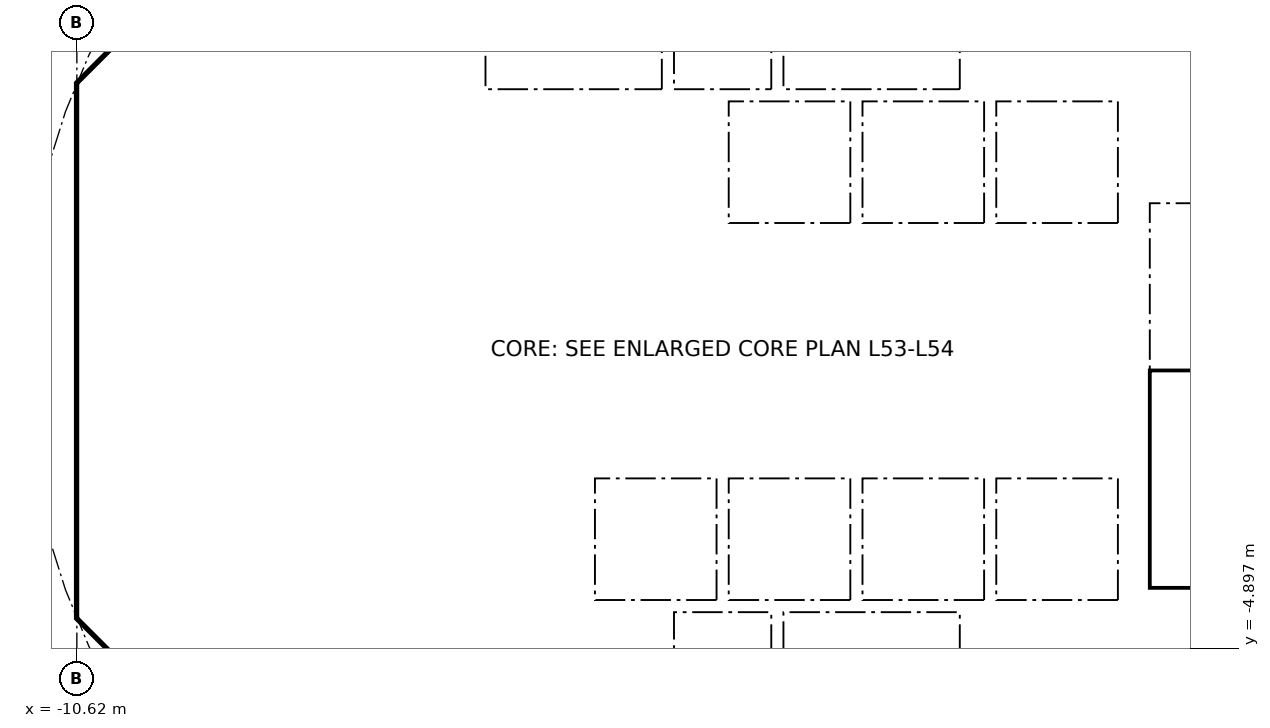
"""IFC4 building model, lengths in metres.
Left out: names, types, materials, properties, quantities, classifications, styles, units other than length and angle.
Written with IfcOpenShell. Run it as: python <this file> out.ifc"""

import sys

from ifc_helpers import new_model, si_unit, direction, frame, frame_2d, origin, place, context, subcontext, project, spatial, polyline, rectangle, outline, extrude, element, fill, save


model = new_model("IFC4")
c1 = context("Model", 3, precision=1e-05, world=origin(), true_north=direction((0.0, 1.0)))
c2 = subcontext(c1, "Body", "Model", "MODEL_VIEW")
j1 = project(units=[si_unit("LENGTHUNIT", "METRE"), si_unit("PLANEANGLEUNIT", "RADIAN")], contexts=[c1])
p1 = place(None, origin())
s1 = spatial("IfcSite", under=j1, at=p1, CompositionType="ELEMENT")
p2 = place(p1, origin())
s2 = spatial("IfcBuilding", under=s1, at=p2, CompositionType="ELEMENT")
p3 = place(p2, frame((0.0, 0.0, 212.2)))
s3 = spatial("IfcBuildingStorey", under=s2, at=p3, CompositionType="ELEMENT", Elevation=212.2)
p4 = place(p3, frame((9.988, 4.613, 0.0), z_axis=(0.0, 0.0, 1.0), x_axis=(-0.707106781187, 0.707106781187, 0.0)))
e1 = element("IfcWall", 1, at=p4, inside=s3, PredefinedType="SHEAR", context=c2, shape_type="SweptSolid", body=[
    extrude(rectangle(XDim=7.602, YDim=0.6, at=frame_2d((3.801, 0.0))), origin(), (0.0, 0.0, 1.0), 3.44),
])
p5 = place(p4, frame((3.201, 0.0, 0.0)))
e2 = element("IfcOpeningElement", 2, at=p5, cuts=e1, PredefinedType="OPENING", context=c2, shape_type="SweptSolid", body=[
    extrude(rectangle(XDim=1.2, YDim=2.1, at=frame_2d((0.6, 1.05))), frame((0.0, 0.31, 0.0), z_axis=(0.0, -1.0, 0.0), x_axis=(1.0, 0.0, 0.0)), (0.0, 0.0, 1.0), 0.62),
])
p6 = place(p3, frame((-4.613, 9.988, 0.0), z_axis=(0.0, 0.0, 1.0), x_axis=(-0.707106781187, -0.707106781187, 0.0)))
e3 = element("IfcWall", 3, at=p6, inside=s3, PredefinedType="SHEAR", context=c2, shape_type="SweptSolid", body=[
    extrude(rectangle(XDim=7.602, YDim=0.6, at=frame_2d((3.801, 0.0))), origin(), (0.0, 0.0, 1.0), 3.44),
])
p7 = place(p6, frame((0.351, 0.0, 0.0)))
e4 = element("IfcOpeningElement", 4, at=p7, cuts=e3, PredefinedType="OPENING", context=c2, shape_type="SweptSolid", body=[
    extrude(rectangle(XDim=1.1, YDim=2.1, at=frame_2d((0.55, 1.05))), frame((0.0, 0.31, 0.0), z_axis=(0.0, -1.0, 0.0), x_axis=(1.0, 0.0, 0.0)), (0.0, 0.0, 1.0), 0.62),
])
p8 = place(p3, frame((-10.325, 3.801, 0.0), z_axis=(0.0, 0.0, 1.0), x_axis=(0.0, -1.0, 0.0)))
e5 = element("IfcWall", 5, at=p8, inside=s3, PredefinedType="SHEAR", context=c2, shape_type="SweptSolid", body=[
    extrude(rectangle(XDim=7.602, YDim=0.6, at=frame_2d((3.801, 0.0))), origin(), (0.0, 0.0, 1.0), 3.44),
])
p9 = place(p8, frame((0.651, 0.0, 0.0)))
e6 = element("IfcOpeningElement", 6, at=p9, cuts=e5, PredefinedType="OPENING", context=c2, shape_type="SweptSolid", body=[
    extrude(rectangle(XDim=1.5, YDim=2.1, at=frame_2d((0.75, 1.05))), frame((0.0, 0.31, 0.0), z_axis=(0.0, -1.0, 0.0), x_axis=(1.0, 0.0, 0.0)), (0.0, 0.0, 1.0), 0.62),
])
p10 = place(p8, frame((5.451, 0.0, 0.0)))
e7 = element("IfcOpeningElement", 7, at=p10, cuts=e5, PredefinedType="OPENING", context=c2, shape_type="SweptSolid", body=[
    extrude(rectangle(XDim=1.5, YDim=2.1, at=frame_2d((0.75, 1.05))), frame((0.0, 0.31, 0.0), z_axis=(0.0, -1.0, 0.0), x_axis=(1.0, 0.0, 0.0)), (0.0, 0.0, 1.0), 0.62),
])
p11 = place(p3, frame((-9.988, -4.613, 0.0), z_axis=(0.0, 0.0, 1.0), x_axis=(0.707106781187, -0.707106781187, 0.0)))
e8 = element("IfcWall", 8, at=p11, inside=s3, PredefinedType="SHEAR", context=c2, shape_type="SweptSolid", body=[
    extrude(rectangle(XDim=7.602, YDim=0.6, at=frame_2d((3.801, 0.0))), origin(), (0.0, 0.0, 1.0), 3.44),
])
p12 = place(p11, frame((6.151, 0.0, 0.0)))
e9 = element("IfcOpeningElement", 9, at=p12, cuts=e8, PredefinedType="OPENING", context=c2, shape_type="SweptSolid", body=[
    extrude(rectangle(XDim=1.1, YDim=2.1, at=frame_2d((0.55, 1.05))), frame((0.0, 0.31, 0.0), z_axis=(0.0, -1.0, 0.0), x_axis=(1.0, 0.0, 0.0)), (0.0, 0.0, 1.0), 0.62),
])
p13 = place(p3, frame((4.613, -9.988, 0.0), z_axis=(0.0, 0.0, 1.0), x_axis=(0.707106781187, 0.707106781187, 0.0)))
e10 = element("IfcWall", 10, at=p13, inside=s3, PredefinedType="SHEAR", context=c2, shape_type="SweptSolid", body=[
    extrude(rectangle(XDim=7.602, YDim=0.6, at=frame_2d((3.801, 0.0))), origin(), (0.0, 0.0, 1.0), 3.44),
])
p14 = place(p13, frame((3.201, 0.0, 0.0)))
e11 = element("IfcOpeningElement", 11, at=p14, cuts=e10, PredefinedType="OPENING", context=c2, shape_type="SweptSolid", body=[
    extrude(rectangle(XDim=1.2, YDim=2.1, at=frame_2d((0.6, 1.05))), frame((0.0, 0.31, 0.0), z_axis=(0.0, -1.0, 0.0), x_axis=(1.0, 0.0, 0.0)), (0.0, 0.0, 1.0), 0.62),
])
p15 = place(p3, frame((-5.8, 4.3, 0.0), z_axis=(0.0, 0.0, 1.0), x_axis=(0.0, 1.0, 0.0)))
e12 = element("IfcWall", 12, at=p15, inside=s3, PredefinedType="PARTITIONING", context=c2, shape_type="SweptSolid", body=[
    extrude(rectangle(XDim=3.927, YDim=0.15, at=frame_2d((1.963, 0.0))), origin(), (0.0, 0.0, 1.0), 3.44),
])
p16 = place(p15, frame((1.551, 0.0, 0.0)))
e13 = element("IfcOpeningElement", 13, at=p16, cuts=e12, PredefinedType="OPENING", context=c2, shape_type="SweptSolid", body=[
    extrude(rectangle(XDim=0.9, YDim=2.1, at=frame_2d((0.45, 1.05))), frame((0.0, 0.085, 0.0), z_axis=(0.0, -1.0, 0.0), x_axis=(1.0, 0.0, 0.0)), (0.0, 0.0, 1.0), 0.17),
])
p17 = place(p3, frame((4.0, 4.3, 0.0), z_axis=(0.0, 0.0, 1.0), x_axis=(0.0, 1.0, 0.0)))
e14 = element("IfcWall", 14, at=p17, inside=s3, PredefinedType="SOLIDWALL", context=c2, shape_type="SweptSolid", body=[
    extrude(rectangle(XDim=2.2, YDim=0.2, at=frame_2d((1.1, 0.0))), origin(), (0.0, 0.0, 1.0), 3.44),
])
p18 = place(p17, frame((0.55, 0.0, 0.0)))
e15 = element("IfcOpeningElement", 15, at=p18, cuts=e14, PredefinedType="OPENING", context=c2, shape_type="SweptSolid", body=[
    extrude(rectangle(XDim=1.1, YDim=2.1, at=frame_2d((0.55, 1.05))), frame((0.0, 0.11, 0.0), z_axis=(0.0, -1.0, 0.0), x_axis=(1.0, 0.0, 0.0)), (0.0, 0.0, 1.0), 0.22),
])
p19 = place(p3, frame((-4.0, 4.3, 0.0), z_axis=(0.0, 0.0, 1.0), x_axis=(0.0, 1.0, 0.0)))
e16 = element("IfcWall", 16, at=p19, inside=s3, PredefinedType="SOLIDWALL", context=c2, shape_type="SweptSolid", body=[
    extrude(rectangle(XDim=2.2, YDim=0.2, at=frame_2d((1.1, 0.0))), origin(), (0.0, 0.0, 1.0), 3.44),
])
p20 = place(p19, frame((0.55, 0.0, 0.0)))
e17 = element("IfcOpeningElement", 17, at=p20, cuts=e16, PredefinedType="OPENING", context=c2, shape_type="SweptSolid", body=[
    extrude(rectangle(XDim=1.1, YDim=2.1, at=frame_2d((0.55, 1.05))), frame((0.0, 0.11, 0.0), z_axis=(0.0, -1.0, 0.0), x_axis=(1.0, 0.0, 0.0)), (0.0, 0.0, 1.0), 0.22),
])
p21 = place(p3, frame((-6.7, 2.0, 0.0), z_axis=(0.0, 0.0, 1.0), x_axis=(1.0, 0.0, 0.0)))
e18 = element("IfcWall", 18, at=p21, inside=s3, PredefinedType="SOLIDWALL", context=c2, shape_type="SweptSolid", body=[
    extrude(rectangle(XDim=13.4, YDim=0.2, at=frame_2d((6.7, 0.0))), origin(), (0.0, 0.0, 1.0), 3.44),
])
p22 = place(p21, frame((7.25, 0.0, 0.0)))
e19 = element("IfcOpeningElement", 19, at=p22, cuts=e18, PredefinedType="OPENING", context=c2, shape_type="SweptSolid", body=[
    extrude(rectangle(XDim=1.1, YDim=2.1, at=frame_2d((0.55, 1.05))), frame((0.0, 0.11, 0.0), z_axis=(0.0, -1.0, 0.0), x_axis=(1.0, 0.0, 0.0)), (0.0, 0.0, 1.0), 0.22),
])
p23 = place(p21, frame((9.45, 0.0, 0.0)))
e20 = element("IfcOpeningElement", 20, at=p23, cuts=e18, PredefinedType="OPENING", context=c2, shape_type="SweptSolid", body=[
    extrude(rectangle(XDim=1.1, YDim=2.1, at=frame_2d((0.55, 1.05))), frame((0.0, 0.11, 0.0), z_axis=(0.0, -1.0, 0.0), x_axis=(1.0, 0.0, 0.0)), (0.0, 0.0, 1.0), 0.22),
])
p24 = place(p21, frame((0.75, 0.0, 0.0)))
e21 = element("IfcOpeningElement", 21, at=p24, cuts=e18, PredefinedType="OPENING", context=c2, shape_type="SweptSolid", body=[
    extrude(rectangle(XDim=0.9, YDim=2.1, at=frame_2d((0.45, 1.05))), frame((0.0, 0.11, 0.0), z_axis=(0.0, -1.0, 0.0), x_axis=(1.0, 0.0, 0.0)), (0.0, 0.0, 1.0), 0.22),
])
p25 = place(p21, frame((4.05, 0.0, 0.0)))
e22 = element("IfcOpeningElement", 22, at=p25, cuts=e18, PredefinedType="OPENING", context=c2, shape_type="SweptSolid", body=[
    extrude(rectangle(XDim=0.9, YDim=2.1, at=frame_2d((0.45, 1.05))), frame((0.0, 0.11, 0.0), z_axis=(0.0, -1.0, 0.0), x_axis=(1.0, 0.0, 0.0)), (0.0, 0.0, 1.0), 0.22),
])
p26 = place(p3, frame((6.7, 4.0, 0.0), z_axis=(0.0, 0.0, 1.0), x_axis=(1.0, 0.0, 0.0)))
e23 = element("IfcWall", 23, at=p26, inside=s3, PredefinedType="SOLIDWALL", context=c2, shape_type="SweptSolid", body=[
    extrude(rectangle(XDim=3.325, YDim=0.2, at=frame_2d((1.662, 0.0))), origin(), (0.0, 0.0, 1.0), 3.44),
])
p27 = place(p26, frame((1.25, 0.0, 0.0)))
e24 = element("IfcOpeningElement", 24, at=p27, cuts=e23, PredefinedType="OPENING", context=c2, shape_type="SweptSolid", body=[
    extrude(rectangle(XDim=1.1, YDim=2.1, at=frame_2d((0.55, 1.05))), frame((0.0, 0.11, 0.0), z_axis=(0.0, -1.0, 0.0), x_axis=(1.0, 0.0, 0.0)), (0.0, 0.0, 1.0), 0.22),
])
p28 = place(p3, frame((-5.8, -8.227, 0.0), z_axis=(0.0, 0.0, 1.0), x_axis=(0.0, 1.0, 0.0)))
e25 = element("IfcWall", 25, at=p28, inside=s3, PredefinedType="PARTITIONING", context=c2, shape_type="SweptSolid", body=[
    extrude(rectangle(XDim=3.927, YDim=0.15, at=frame_2d((1.963, 0.0))), origin(), (0.0, 0.0, 1.0), 3.44),
])
p29 = place(p28, frame((2.615, 0.0, 0.0)))
e26 = element("IfcOpeningElement", 26, at=p29, cuts=e25, PredefinedType="OPENING", context=c2, shape_type="SweptSolid", body=[
    extrude(rectangle(XDim=0.9, YDim=2.1, at=frame_2d((0.45, 1.05))), frame((0.0, 0.085, 0.0), z_axis=(0.0, -1.0, 0.0), x_axis=(1.0, 0.0, 0.0)), (0.0, 0.0, 1.0), 0.17),
])
p30 = place(p28, frame((0.539, 0.0, 0.0)))
e27 = element("IfcOpeningElement", 27, at=p30, cuts=e25, PredefinedType="OPENING", context=c2, shape_type="SweptSolid", body=[
    extrude(rectangle(XDim=0.9, YDim=2.1, at=frame_2d((0.45, 1.05))), frame((0.0, 0.085, 0.0), z_axis=(0.0, -1.0, 0.0), x_axis=(1.0, 0.0, 0.0)), (0.0, 0.0, 1.0), 0.17),
])
p31 = place(p3, frame((4.0, -6.5, 0.0), z_axis=(0.0, 0.0, 1.0), x_axis=(0.0, 1.0, 0.0)))
e28 = element("IfcWall", 28, at=p31, inside=s3, PredefinedType="SOLIDWALL", context=c2, shape_type="SweptSolid", body=[
    extrude(rectangle(XDim=2.2, YDim=0.2, at=frame_2d((1.1, 0.0))), origin(), (0.0, 0.0, 1.0), 3.44),
])
p32 = place(p31, frame((0.55, 0.0, 0.0)))
e29 = element("IfcOpeningElement", 29, at=p32, cuts=e28, PredefinedType="OPENING", context=c2, shape_type="SweptSolid", body=[
    extrude(rectangle(XDim=1.1, YDim=2.1, at=frame_2d((0.55, 1.05))), frame((0.0, 0.11, 0.0), z_axis=(0.0, -1.0, 0.0), x_axis=(1.0, 0.0, 0.0)), (0.0, 0.0, 1.0), 0.22),
])
p33 = place(p3, frame((-4.0, -6.5, 0.0), z_axis=(0.0, 0.0, 1.0), x_axis=(0.0, 1.0, 0.0)))
e30 = element("IfcWall", 30, at=p33, inside=s3, PredefinedType="SOLIDWALL", context=c2, shape_type="SweptSolid", body=[
    extrude(rectangle(XDim=2.2, YDim=0.2, at=frame_2d((1.1, 0.0))), origin(), (0.0, 0.0, 1.0), 3.44),
])
p34 = place(p33, frame((0.65, 0.0, 0.0)))
e31 = element("IfcOpeningElement", 31, at=p34, cuts=e30, PredefinedType="OPENING", context=c2, shape_type="SweptSolid", body=[
    extrude(rectangle(XDim=0.9, YDim=2.1, at=frame_2d((0.45, 1.05))), frame((0.0, 0.11, 0.0), z_axis=(0.0, -1.0, 0.0), x_axis=(1.0, 0.0, 0.0)), (0.0, 0.0, 1.0), 0.22),
])
p35 = place(p3, frame((-6.7, -2.0, 0.0), z_axis=(0.0, 0.0, 1.0), x_axis=(1.0, 0.0, 0.0)))
e32 = element("IfcWall", 32, at=p35, inside=s3, PredefinedType="SOLIDWALL", context=c2, shape_type="SweptSolid", body=[
    extrude(rectangle(XDim=13.4, YDim=0.2, at=frame_2d((6.7, 0.0))), origin(), (0.0, 0.0, 1.0), 3.44),
])
p36 = place(p35, frame((5.05, 0.0, 0.0)))
e33 = element("IfcOpeningElement", 33, at=p36, cuts=e32, PredefinedType="OPENING", context=c2, shape_type="SweptSolid", body=[
    extrude(rectangle(XDim=1.1, YDim=2.1, at=frame_2d((0.55, 1.05))), frame((0.0, 0.11, 0.0), z_axis=(0.0, -1.0, 0.0), x_axis=(1.0, 0.0, 0.0)), (0.0, 0.0, 1.0), 0.22),
])
p37 = place(p35, frame((7.25, 0.0, 0.0)))
e34 = element("IfcOpeningElement", 34, at=p37, cuts=e32, PredefinedType="OPENING", context=c2, shape_type="SweptSolid", body=[
    extrude(rectangle(XDim=1.1, YDim=2.1, at=frame_2d((0.55, 1.05))), frame((0.0, 0.11, 0.0), z_axis=(0.0, -1.0, 0.0), x_axis=(1.0, 0.0, 0.0)), (0.0, 0.0, 1.0), 0.22),
])
p38 = place(p35, frame((1.85, 0.0, 0.0)))
e35 = element("IfcOpeningElement", 35, at=p38, cuts=e32, PredefinedType="OPENING", context=c2, shape_type="SweptSolid", body=[
    extrude(rectangle(XDim=0.9, YDim=2.1, at=frame_2d((0.45, 1.05))), frame((0.0, 0.11, 0.0), z_axis=(0.0, -1.0, 0.0), x_axis=(1.0, 0.0, 0.0)), (0.0, 0.0, 1.0), 0.22),
])
p39 = place(p3, origin())
e36 = element("IfcWall", 36, at=p39, inside=s3, PredefinedType="SHEAR", context=c2, shape_type="SweptSolid", body=[
    extrude(outline(polyline([(-10.625, -3.801), (-10.025, -3.801), (-10.025, -4.152), (-9.776, -4.401), (-10.2, -4.825), (-10.625, -4.401), (-10.625, -3.801)])), origin(), (0.0, 0.0, 1.0), 3.44),
])
p40 = place(p3, origin())
e37 = element("IfcWall", 37, at=p40, inside=s3, PredefinedType="SHEAR", context=c2, shape_type="SweptSolid", body=[
    extrude(outline(polyline([(-10.2, 4.825), (-9.776, 4.401), (-10.025, 4.152), (-10.025, 3.801), (-10.625, 3.801), (-10.625, 4.401), (-10.2, 4.825)])), origin(), (0.0, 0.0, 1.0), 3.44),
])
for number, where, z_axis, x_axis in (
    (38, (-0.9, 4.3, 0.0), (0.0, 0.0, 1.0), (0.0, 1.0, 0.0)),
    (39, (0.9, 4.3, 0.0), (0.0, 0.0, 1.0), (0.0, 1.0, 0.0)),
):
    element("IfcWall", number, at=place(p3, frame(where, z_axis=z_axis, x_axis=x_axis)), inside=s3, PredefinedType="SOLIDWALL", context=c2, shape_type="SweptSolid", body=[
        extrude(rectangle(XDim=2.2, YDim=0.2, at=frame_2d((1.1, 0.0))), origin(), (0.0, 0.0, 1.0), 3.44),
    ])
p41 = place(p3, origin())
e40 = element("IfcWall", 40, at=p41, inside=s3, PredefinedType="SOLIDWALL", context=c2, shape_type="SweptSolid", body=[
    extrude(outline(polyline([(-6.7, 4.3), (6.7, 4.3), (6.7, 2.1), (6.5, 2.1), (6.5, 4.1), (4.5, 4.1), (4.5, 2.1), (4.3, 2.1), (4.3, 4.1), (2.3, 4.1), (2.3, 2.1), (2.1, 2.1), (2.1, 4.1), (0.1, 4.1), (0.1, 2.1), (-0.1, 2.1), (-0.1, 4.1), (-4.3, 4.1), (-4.3, 2.1), (-4.5, 2.1), (-4.5, 4.1), (-6.5, 4.1), (-6.5, 2.1), (-6.7, 2.1), (-6.7, 4.3)])), origin(), (0.0, 0.0, 1.0), 3.44),
])
for number, where, z_axis, x_axis in (
    (41, (-0.9, -6.5, 0.0), (0.0, 0.0, 1.0), (0.0, 1.0, 0.0)),
    (42, (0.9, -6.5, 0.0), (0.0, 0.0, 1.0), (0.0, 1.0, 0.0)),
):
    element("IfcWall", number, at=place(p3, frame(where, z_axis=z_axis, x_axis=x_axis)), inside=s3, PredefinedType="SOLIDWALL", context=c2, shape_type="SweptSolid", body=[
        extrude(rectangle(XDim=2.2, YDim=0.2, at=frame_2d((1.1, 0.0))), origin(), (0.0, 0.0, 1.0), 3.44),
    ])
p42 = place(p3, origin())
e43 = element("IfcWall", 43, at=p42, inside=s3, PredefinedType="SOLIDWALL", context=c2, shape_type="SweptSolid", body=[
    extrude(outline(polyline([(-6.7, -2.1), (-6.5, -2.1), (-6.5, -4.1), (-2.3, -4.1), (-2.3, -2.1), (-2.1, -2.1), (-2.1, -4.1), (-0.1, -4.1), (-0.1, -2.1), (0.1, -2.1), (0.1, -4.1), (2.1, -4.1), (2.1, -2.1), (2.3, -2.1), (2.3, -4.1), (4.3, -4.1), (4.3, -2.1), (4.5, -2.1), (4.5, -4.1), (6.5, -4.1), (6.5, -2.1), (6.7, -2.1), (6.7, -4.3), (-6.7, -4.3), (-6.7, -2.1)])), origin(), (0.0, 0.0, 1.0), 3.44),
])
for number, where, z_axis, x_axis in (
    (44, (-10.025, -4.0, 0.0), (0.0, 0.0, 1.0), (1.0, 0.0, 0.0)),
    (45, (-10.025, 4.0, 0.0), (0.0, 0.0, 1.0), (1.0, 0.0, 0.0)),
):
    element("IfcWall", number, at=place(p3, frame(where, z_axis=z_axis, x_axis=x_axis)), inside=s3, PredefinedType="PARTITIONING", context=c2, shape_type="SweptSolid", body=[
        extrude(rectangle(XDim=3.325, YDim=0.2, at=frame_2d((1.662, 0.0))), origin(), (0.0, 0.0, 1.0), 3.44),
    ])
p43 = place(p3, origin())
e46 = element("IfcWall", 46, at=p43, inside=s3, PredefinedType="SOLIDWALL", context=c2, shape_type="SweptSolid", body=[
    extrude(outline(polyline([(7.025, -3.9), (6.7, -3.9), (6.7, 3.9), (7.025, 3.9), (7.025, -3.9)])), origin(), (0.0, 0.0, 1.0), 3.44),
])
p44 = place(p3, origin())
e47 = element("IfcWall", 47, at=p44, inside=s3, PredefinedType="SOLIDWALL", context=c2, shape_type="SweptSolid", body=[
    extrude(outline(polyline([(10.025, -4.1), (6.7, -4.1), (6.7, -3.9), (10.025, -3.9), (10.025, -4.1)])), origin(), (0.0, 0.0, 1.0), 3.44),
])
p45 = place(p22, origin())
e48 = element("IfcDoor", 48, at=p45, inside=s3, OperationType="DOUBLE_DOOR_SLIDING", PredefinedType="DOOR", context=c2, shape_type="SweptSolid", body=[
    extrude(rectangle(XDim=1.1, YDim=2.1, at=frame_2d((0.55, 1.05))), frame((0.0, 0.025, 0.0), z_axis=(0.0, -1.0, 0.0), x_axis=(1.0, 0.0, 0.0)), (0.0, 0.0, 1.0), 0.05),
])
fill(e19, e48)
p46 = place(p23, origin())
e49 = element("IfcDoor", 49, at=p46, inside=s3, OperationType="DOUBLE_DOOR_SLIDING", PredefinedType="DOOR", context=c2, shape_type="SweptSolid", body=[
    extrude(rectangle(XDim=1.1, YDim=2.1, at=frame_2d((0.55, 1.05))), frame((0.0, 0.025, 0.0), z_axis=(0.0, -1.0, 0.0), x_axis=(1.0, 0.0, 0.0)), (0.0, 0.0, 1.0), 0.05),
])
fill(e20, e49)
p47 = place(p36, origin())
e50 = element("IfcDoor", 50, at=p47, inside=s3, OperationType="DOUBLE_DOOR_SLIDING", PredefinedType="DOOR", context=c2, shape_type="SweptSolid", body=[
    extrude(rectangle(XDim=1.1, YDim=2.1, at=frame_2d((0.55, 1.05))), frame((0.0, 0.025, 0.0), z_axis=(0.0, -1.0, 0.0), x_axis=(1.0, 0.0, 0.0)), (0.0, 0.0, 1.0), 0.05),
])
fill(e33, e50)
p48 = place(p37, origin())
e51 = element("IfcDoor", 51, at=p48, inside=s3, OperationType="DOUBLE_DOOR_SLIDING", PredefinedType="DOOR", context=c2, shape_type="SweptSolid", body=[
    extrude(rectangle(XDim=1.1, YDim=2.1, at=frame_2d((0.55, 1.05))), frame((0.0, 0.025, 0.0), z_axis=(0.0, -1.0, 0.0), x_axis=(1.0, 0.0, 0.0)), (0.0, 0.0, 1.0), 0.05),
])
fill(e34, e51)
p49 = place(p18, origin())
e52 = element("IfcDoor", 52, at=p49, inside=s3, OperationType="DOUBLE_DOOR_SLIDING", PredefinedType="DOOR", context=c2, shape_type="SweptSolid", body=[
    extrude(rectangle(XDim=1.1, YDim=2.1, at=frame_2d((0.55, 1.05))), frame((0.0, 0.025, 0.0), z_axis=(0.0, -1.0, 0.0), x_axis=(1.0, 0.0, 0.0)), (0.0, 0.0, 1.0), 0.05),
])
fill(e15, e52)
p50 = place(p32, origin())
e53 = element("IfcDoor", 53, at=p50, inside=s3, OperationType="DOUBLE_DOOR_SLIDING", PredefinedType="DOOR", context=c2, shape_type="SweptSolid", body=[
    extrude(rectangle(XDim=1.1, YDim=2.1, at=frame_2d((0.55, 1.05))), frame((0.0, 0.025, 0.0), z_axis=(0.0, -1.0, 0.0), x_axis=(1.0, 0.0, 0.0)), (0.0, 0.0, 1.0), 0.05),
])
fill(e29, e53)
p51 = place(p20, origin())
e54 = element("IfcDoor", 54, at=p51, inside=s3, OperationType="DOUBLE_DOOR_SLIDING", PredefinedType="DOOR", context=c2, shape_type="SweptSolid", body=[
    extrude(rectangle(XDim=1.1, YDim=2.1, at=frame_2d((0.55, 1.05))), frame((0.0, 0.025, 0.0), z_axis=(0.0, -1.0, 0.0), x_axis=(1.0, 0.0, 0.0)), (0.0, 0.0, 1.0), 0.05),
])
fill(e17, e54)
p52 = place(p29, origin())
e55 = element("IfcDoor", 55, at=p52, inside=s3, OperationType="SINGLE_SWING_LEFT", PredefinedType="DOOR", context=c2, shape_type="SweptSolid", body=[
    extrude(rectangle(XDim=0.9, YDim=2.1, at=frame_2d((0.45, 1.05))), frame((0.0, 0.025, 0.0), z_axis=(0.0, -1.0, 0.0), x_axis=(1.0, 0.0, 0.0)), (0.0, 0.0, 1.0), 0.05),
])
fill(e26, e55)
p53 = place(p24, origin())
e56 = element("IfcDoor", 56, at=p53, inside=s3, OperationType="SINGLE_SWING_RIGHT", PredefinedType="DOOR", context=c2, shape_type="SweptSolid", body=[
    extrude(rectangle(XDim=0.9, YDim=2.1, at=frame_2d((0.45, 1.05))), frame((0.0, 0.025, 0.0), z_axis=(0.0, -1.0, 0.0), x_axis=(1.0, 0.0, 0.0)), (0.0, 0.0, 1.0), 0.05),
])
fill(e21, e56)
p54 = place(p25, origin())
e57 = element("IfcDoor", 57, at=p54, inside=s3, OperationType="SINGLE_SWING_RIGHT", PredefinedType="DOOR", context=c2, shape_type="SweptSolid", body=[
    extrude(rectangle(XDim=0.9, YDim=2.1, at=frame_2d((0.45, 1.05))), frame((0.0, 0.025, 0.0), z_axis=(0.0, -1.0, 0.0), x_axis=(1.0, 0.0, 0.0)), (0.0, 0.0, 1.0), 0.05),
])
fill(e22, e57)
p55 = place(p38, frame((0.9, 0.0, 0.0), x_axis=(-1.0, 0.0, 0.0)))
e58 = element("IfcDoor", 58, at=p55, inside=s3, OperationType="SINGLE_SWING_LEFT", PredefinedType="DOOR", context=c2, shape_type="SweptSolid", body=[
    extrude(rectangle(XDim=0.9, YDim=2.1, at=frame_2d((0.45, 1.05))), frame((0.0, 0.025, 0.0), z_axis=(0.0, -1.0, 0.0), x_axis=(1.0, 0.0, 0.0)), (0.0, 0.0, 1.0), 0.05),
])
fill(e35, e58)
p56 = place(p9, origin())
e59 = element("IfcDoor", 59, at=p56, inside=s3, OperationType="DOUBLE_DOOR_SINGLE_SWING", PredefinedType="DOOR", context=c2, shape_type="SweptSolid", body=[
    extrude(rectangle(XDim=1.5, YDim=2.1, at=frame_2d((0.75, 1.05))), frame((0.0, 0.025, 0.0), z_axis=(0.0, -1.0, 0.0), x_axis=(1.0, 0.0, 0.0)), (0.0, 0.0, 1.0), 0.05),
])
fill(e6, e59)
p57 = place(p10, origin())
e60 = element("IfcDoor", 60, at=p57, inside=s3, OperationType="DOUBLE_DOOR_SINGLE_SWING", PredefinedType="DOOR", context=c2, shape_type="SweptSolid", body=[
    extrude(rectangle(XDim=1.5, YDim=2.1, at=frame_2d((0.75, 1.05))), frame((0.0, 0.025, 0.0), z_axis=(0.0, -1.0, 0.0), x_axis=(1.0, 0.0, 0.0)), (0.0, 0.0, 1.0), 0.05),
])
fill(e7, e60)
save(model, sys.argv[1])
